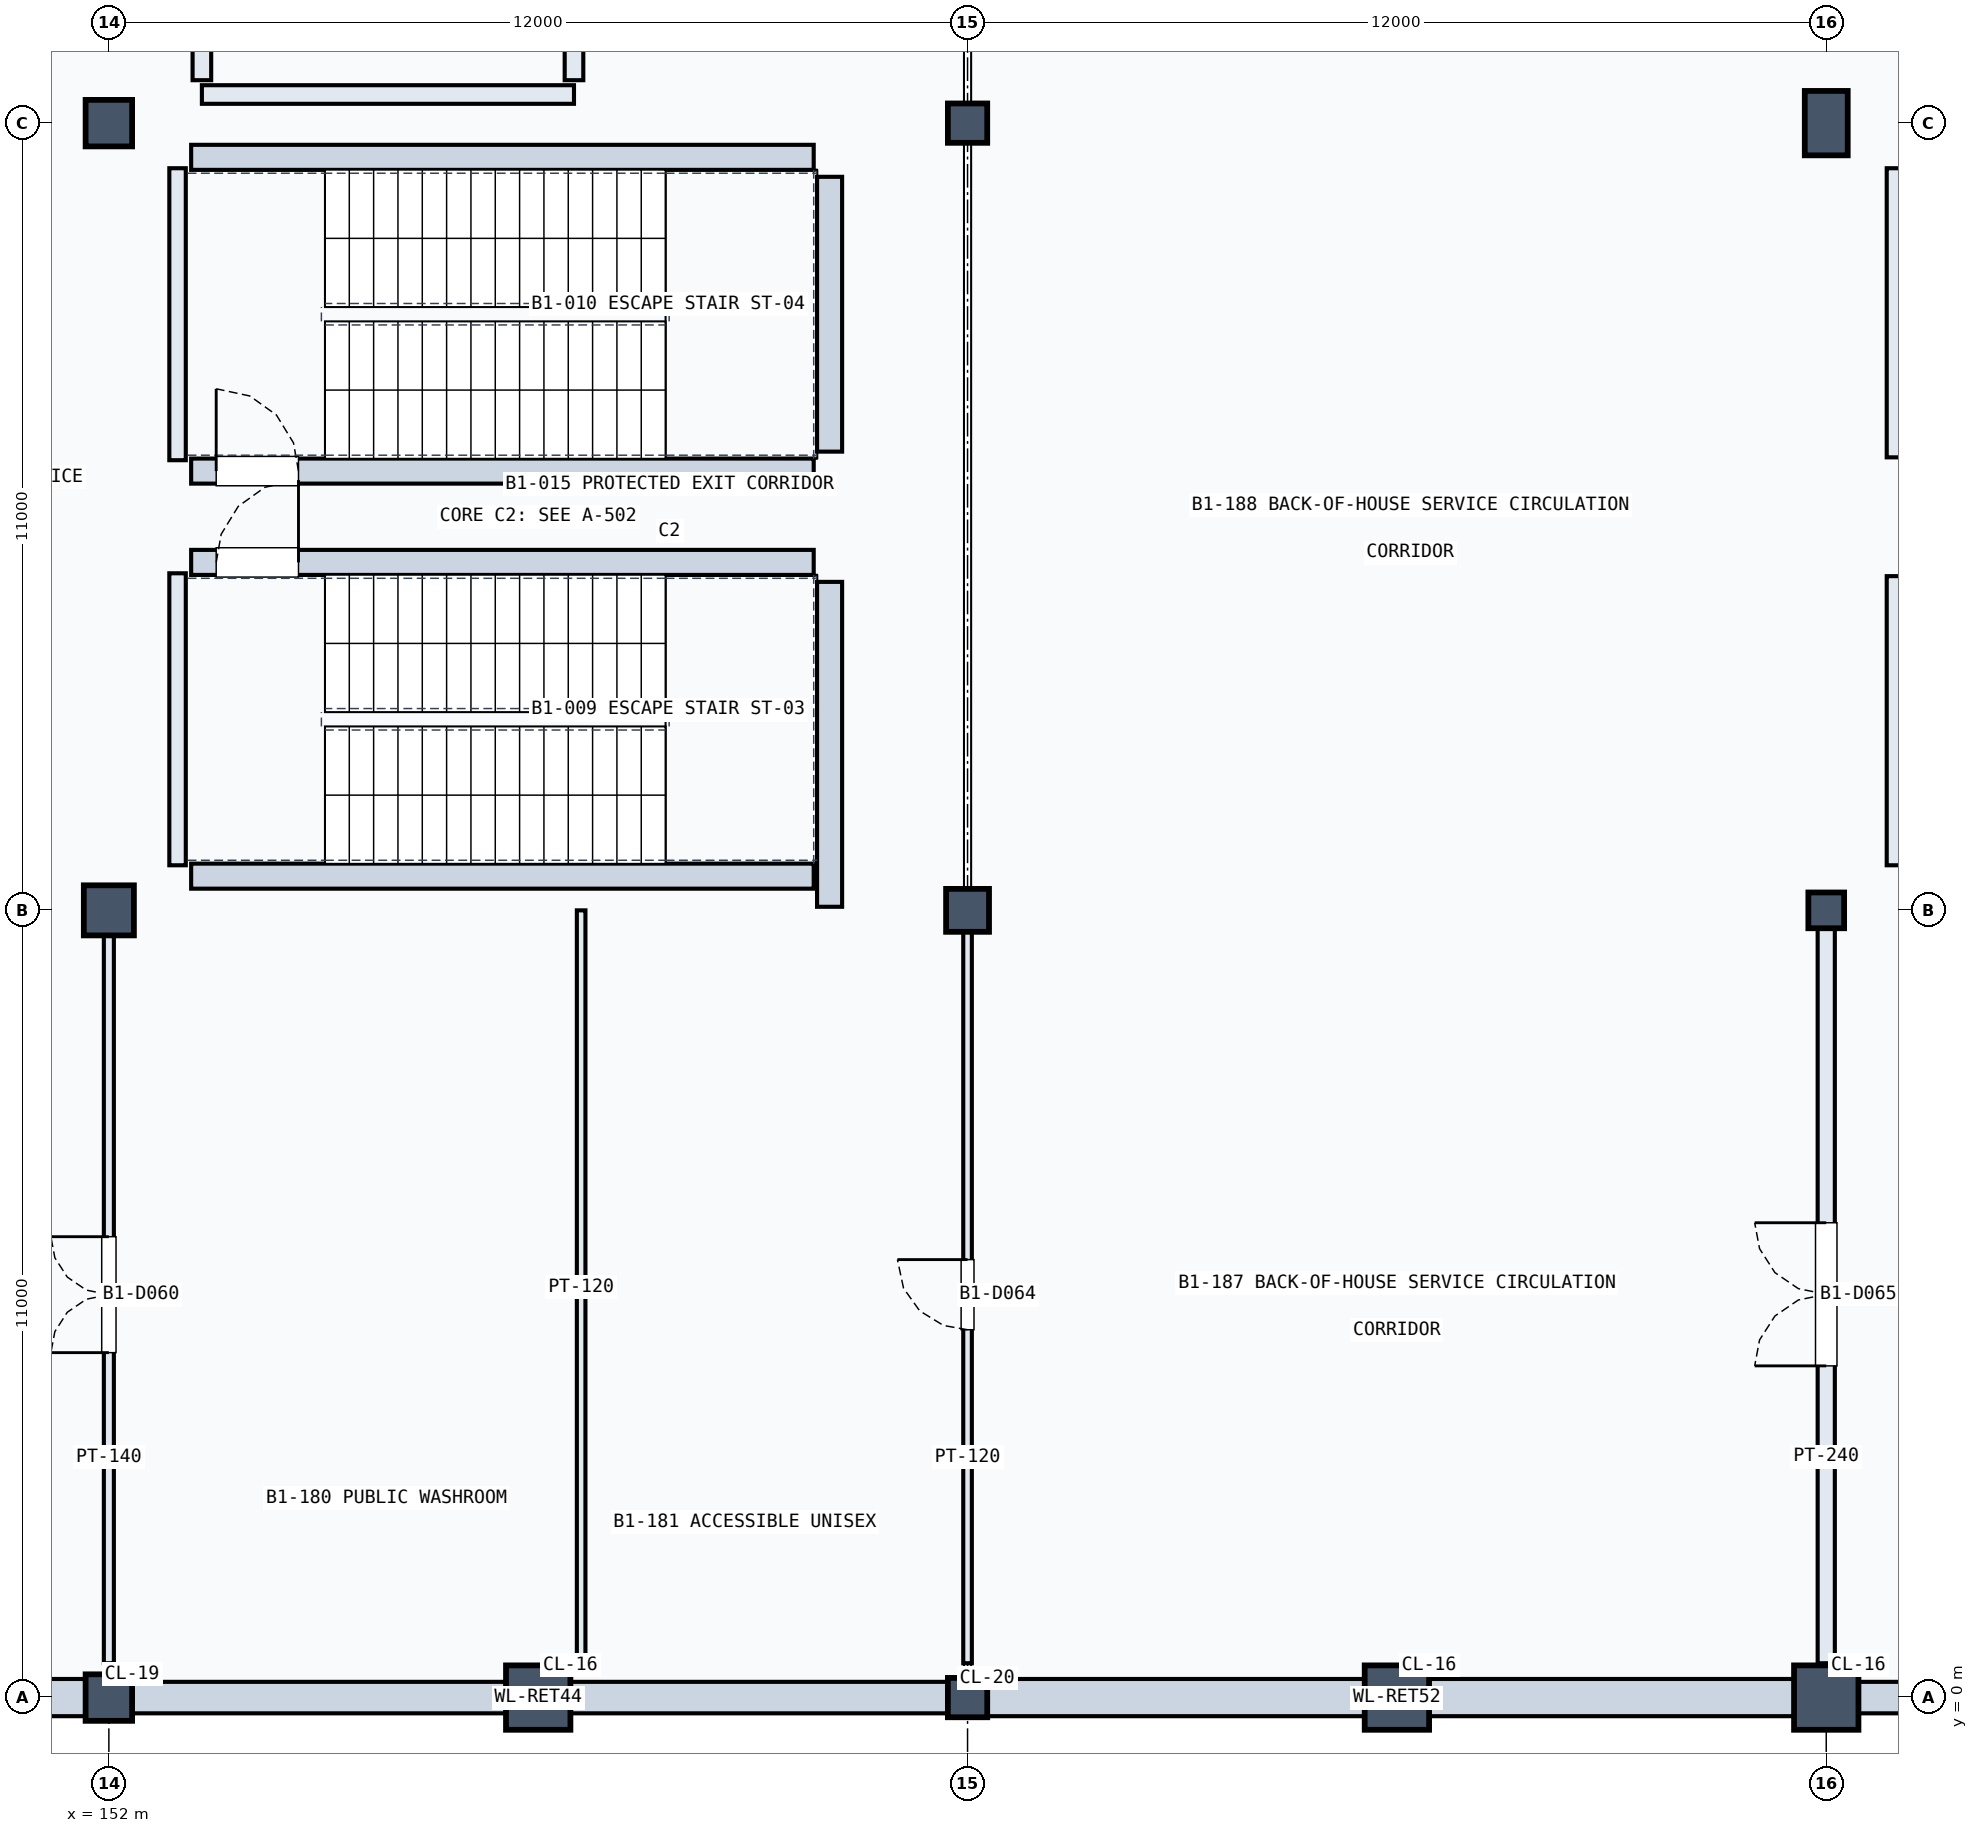
"""IFC4 building model, lengths in metres.
Left out: names, types, materials, properties, quantities, classifications, styles, units other than length and angle.
Written with IfcOpenShell. Run it as: python <this file> out.ifc"""

import sys

from ifc_helpers import new_model, si_unit, direction, frame, frame_2d, origin, origin_2d, place, context, subcontext, project, spatial, rectangle, circle, extrude, element, fill, save


model = new_model("IFC4")
c1 = context("Model", 3, precision=1e-05, world=origin(), true_north=direction((0.0, 1.0)))
c2 = subcontext(c1, "Body", "Model", "MODEL_VIEW")
j1 = project(units=[si_unit("LENGTHUNIT", "METRE"), si_unit("PLANEANGLEUNIT", "RADIAN")], contexts=[c1])
p1 = place(None, origin())
s1 = spatial("IfcSite", under=j1, at=p1, CompositionType="ELEMENT")
p2 = place(p1, origin())
s2 = spatial("IfcBuilding", under=s1, at=p2, CompositionType="ELEMENT")
p3 = place(p2, frame((0.0, 0.0, -5.4)))
s3 = spatial("IfcBuildingStorey", under=s2, at=p3, CompositionType="ELEMENT", Elevation=-5.4)
p4 = place(p3, frame((152.0, 0.0, 0.0), z_axis=(0.0, 0.0, 1.0), x_axis=(1.0, 0.0, 0.0)))
e1 = element("IfcColumn", 1, at=p4, inside=s3, PredefinedType="COLUMN", context=c2, shape_type="SweptSolid", body=[
    extrude(circle(Radius=0.325, at=origin_2d()), origin(), (0.0, 0.0, 1.0), 5.4),
])
p5 = place(p3, frame((152.0, 11.0, 0.0), z_axis=(0.0, 0.0, 1.0), x_axis=(1.0, 0.0, 0.0)))
e2 = element("IfcColumn", 2, at=p5, inside=s3, PredefinedType="COLUMN", context=c2, shape_type="SweptSolid", body=[
    extrude(rectangle(XDim=0.7, YDim=0.7, at=origin_2d()), origin(), (0.0, 0.0, 1.0), 5.4),
])
p6 = place(p3, frame((152.0, 22.0, 0.0), z_axis=(0.0, 0.0, 1.0), x_axis=(1.0, 0.0, 0.0)))
e3 = element("IfcColumn", 3, at=p6, inside=s3, PredefinedType="COLUMN", context=c2, shape_type="SweptSolid", body=[
    extrude(rectangle(XDim=0.65, YDim=0.65, at=origin_2d()), origin(), (0.0, 0.0, 1.0), 5.4),
])
p7 = place(p3, frame((164.0, 0.0, 0.0), z_axis=(0.0, 0.0, 1.0), x_axis=(1.0, 0.0, 0.0)))
e4 = element("IfcColumn", 4, at=p7, inside=s3, PredefinedType="COLUMN", context=c2, shape_type="SweptSolid", body=[
    extrude(circle(Radius=0.275, at=origin_2d()), origin(), (0.0, 0.0, 1.0), 5.4),
])
p8 = place(p3, frame((164.0, 11.0, 0.0), z_axis=(0.0, 0.0, 1.0), x_axis=(1.0, 0.0, 0.0)))
e5 = element("IfcColumn", 5, at=p8, inside=s3, PredefinedType="COLUMN", context=c2, shape_type="SweptSolid", body=[
    extrude(rectangle(XDim=0.6, YDim=0.6, at=origin_2d()), origin(), (0.0, 0.0, 1.0), 5.4),
])
p9 = place(p3, frame((164.0, 22.0, 0.0), z_axis=(0.0, 0.0, 1.0), x_axis=(1.0, 0.0, 0.0)))
e6 = element("IfcColumn", 6, at=p9, inside=s3, PredefinedType="COLUMN", context=c2, shape_type="SweptSolid", body=[
    extrude(rectangle(XDim=0.55, YDim=0.55, at=origin_2d()), origin(), (0.0, 0.0, 1.0), 5.4),
])
p10 = place(p3, frame((176.0, 0.0, 0.0), z_axis=(0.0, 0.0, 1.0), x_axis=(1.0, 0.0, 0.0)))
e7 = element("IfcColumn", 7, at=p10, inside=s3, PredefinedType="COLUMN", context=c2, shape_type="SweptSolid", body=[
    extrude(circle(Radius=0.45, at=origin_2d()), origin(), (0.0, 0.0, 1.0), 5.4),
])
p11 = place(p3, frame((176.0, 11.0, 0.0), z_axis=(0.0, 0.0, 1.0), x_axis=(1.0, 0.0, 0.0)))
e8 = element("IfcColumn", 8, at=p11, inside=s3, PredefinedType="COLUMN", context=c2, shape_type="SweptSolid", body=[
    extrude(rectangle(XDim=0.5, YDim=0.5, at=origin_2d()), origin(), (0.0, 0.0, 1.0), 5.4),
])
p12 = place(p3, frame((176.0, 22.0, 0.0), z_axis=(0.0, 0.0, 1.0), x_axis=(1.0, 0.0, 0.0)))
e9 = element("IfcColumn", 9, at=p12, inside=s3, PredefinedType="COLUMN", context=c2, shape_type="SweptSolid", body=[
    extrude(rectangle(XDim=0.6, YDim=0.9, at=origin_2d()), origin(), (0.0, 0.0, 1.0), 5.4),
])
for number, where, z_axis, x_axis in (
    (10, (158.0, 0.0, 0.0), (0.0, 0.0, 1.0), (1.0, 0.0, 0.0)),
    (11, (170.0, 0.0, 0.0), (0.0, 0.0, 1.0), (1.0, 0.0, 0.0)),
):
    element("IfcColumn", number, at=place(p3, frame(where, z_axis=z_axis, x_axis=x_axis)), inside=s3, PredefinedType="COLUMN", context=c2, shape_type="SweptSolid", body=[
        extrude(circle(Radius=0.45, at=origin_2d()), origin(), (0.0, 0.0, 1.0), 5.4),
    ])
p13 = place(p3, frame((140.22, 0.0, 0.0), z_axis=(0.0, 0.0, 1.0), x_axis=(1.0, 0.0, 0.0)))
e12 = element("IfcWall", 12, at=p13, inside=s3, PredefinedType="SOLIDWALL", context=c2, shape_type="SweptSolid", body=[
    extrude(rectangle(XDim=11.56, YDim=0.52, at=frame_2d((5.78, 0.0))), origin(), (0.0, 0.0, 1.0), 4.28),
])
p14 = place(p3, frame((152.22, 0.0, 0.0), z_axis=(0.0, 0.0, 1.0), x_axis=(1.0, 0.0, 0.0)))
e13 = element("IfcWall", 13, at=p14, inside=s3, PredefinedType="SOLIDWALL", context=c2, shape_type="SweptSolid", body=[
    extrude(rectangle(XDim=11.56, YDim=0.44, at=frame_2d((5.78, 0.0))), origin(), (0.0, 0.0, 1.0), 4.28),
])
p15 = place(p3, frame((164.22, 0.0, 0.0), z_axis=(0.0, 0.0, 1.0), x_axis=(1.0, 0.0, 0.0)))
e14 = element("IfcWall", 14, at=p15, inside=s3, PredefinedType="SOLIDWALL", context=c2, shape_type="SweptSolid", body=[
    extrude(rectangle(XDim=11.56, YDim=0.52, at=frame_2d((5.78, 0.0))), origin(), (0.0, 0.0, 1.0), 4.346),
])
p16 = place(p3, frame((176.22, 0.0, 0.0), z_axis=(0.0, 0.0, 1.0), x_axis=(1.0, 0.0, 0.0)))
e15 = element("IfcWall", 15, at=p16, inside=s3, PredefinedType="SOLIDWALL", context=c2, shape_type="SweptSolid", body=[
    extrude(rectangle(XDim=10.56, YDim=0.44, at=frame_2d((5.28, 0.0))), origin(), (0.0, 0.0, 1.0), 4.13),
])
p17 = place(p3, frame((152.96, 11.63, 0.0), z_axis=(0.0, 0.0, 1.0), x_axis=(0.0, 1.0, 0.0)))
e16 = element("IfcWall", 16, at=p17, inside=s3, PredefinedType="SOLIDWALL", context=c2, shape_type="SweptSolid", body=[
    extrude(rectangle(XDim=4.08, YDim=0.23, at=frame_2d((2.04, 0.0))), origin(), (0.0, 0.0, 1.0), 5.04),
])
p18 = place(p3, frame((162.072, 11.05, 0.0), z_axis=(0.0, 0.0, 1.0), x_axis=(0.0, 1.0, 0.0)))
e17 = element("IfcWall", 17, at=p18, inside=s3, PredefinedType="SOLIDWALL", context=c2, shape_type="SweptSolid", body=[
    extrude(rectangle(XDim=4.54, YDim=0.35, at=frame_2d((2.27, 0.0))), origin(), (0.0, 0.0, 1.0), 5.04),
])
p19 = place(p3, frame((153.15, 11.478, 0.0), z_axis=(0.0, 0.0, 1.0), x_axis=(1.0, 0.0, 0.0)))
e18 = element("IfcWall", 18, at=p19, inside=s3, PredefinedType="SOLIDWALL", context=c2, shape_type="SweptSolid", body=[
    extrude(rectangle(XDim=8.7, YDim=0.35, at=frame_2d((4.35, 0.0))), origin(), (0.0, 0.0, 1.0), 5.04),
])
p20 = place(p3, frame((153.15, 15.862, 0.0), z_axis=(0.0, 0.0, 1.0), x_axis=(1.0, 0.0, 0.0)))
e19 = element("IfcWall", 19, at=p20, inside=s3, PredefinedType="SOLIDWALL", context=c2, shape_type="SweptSolid", body=[
    extrude(rectangle(XDim=8.7, YDim=0.35, at=frame_2d((4.35, 0.0))), origin(), (0.0, 0.0, 1.0), 5.04),
])
p21 = place(p20, frame((0.35, 0.0, 0.0)))
e20 = element("IfcOpeningElement", 20, at=p21, cuts=e19, PredefinedType="OPENING", context=c2, shape_type="SweptSolid", body=[
    extrude(rectangle(XDim=1.15, YDim=2.2, at=frame_2d((0.575, 1.1))), frame((0.0, 0.185, 0.0), z_axis=(0.0, -1.0, 0.0), x_axis=(1.0, 0.0, 0.0)), (0.0, 0.0, 1.0), 0.37),
])
p22 = place(p3, frame((152.96, 17.29, 0.0), z_axis=(0.0, 0.0, 1.0), x_axis=(0.0, 1.0, 0.0)))
e21 = element("IfcWall", 21, at=p22, inside=s3, PredefinedType="SOLIDWALL", context=c2, shape_type="SweptSolid", body=[
    extrude(rectangle(XDim=4.08, YDim=0.23, at=frame_2d((2.04, 0.0))), origin(), (0.0, 0.0, 1.0), 5.04),
])
p23 = place(p3, frame((162.072, 17.41, 0.0), z_axis=(0.0, 0.0, 1.0), x_axis=(0.0, 1.0, 0.0)))
e22 = element("IfcWall", 22, at=p23, inside=s3, PredefinedType="SOLIDWALL", context=c2, shape_type="SweptSolid", body=[
    extrude(rectangle(XDim=3.84, YDim=0.35, at=frame_2d((1.92, 0.0))), origin(), (0.0, 0.0, 1.0), 5.04),
])
p24 = place(p3, frame((153.15, 17.138, 0.0), z_axis=(0.0, 0.0, 1.0), x_axis=(1.0, 0.0, 0.0)))
e23 = element("IfcWall", 23, at=p24, inside=s3, PredefinedType="SOLIDWALL", context=c2, shape_type="SweptSolid", body=[
    extrude(rectangle(XDim=8.7, YDim=0.35, at=frame_2d((4.35, 0.0))), origin(), (0.0, 0.0, 1.0), 5.04),
])
p25 = place(p24, frame((0.35, 0.0, 0.0)))
e24 = element("IfcOpeningElement", 24, at=p25, cuts=e23, PredefinedType="OPENING", context=c2, shape_type="SweptSolid", body=[
    extrude(rectangle(XDim=1.15, YDim=2.2, at=frame_2d((0.575, 1.1))), frame((0.0, 0.185, 0.0), z_axis=(0.0, -1.0, 0.0), x_axis=(1.0, 0.0, 0.0)), (0.0, 0.0, 1.0), 0.37),
])
p26 = place(p3, frame((153.15, 21.522, 0.0), z_axis=(0.0, 0.0, 1.0), x_axis=(1.0, 0.0, 0.0)))
e25 = element("IfcWall", 25, at=p26, inside=s3, PredefinedType="SOLIDWALL", context=c2, shape_type="SweptSolid", body=[
    extrude(rectangle(XDim=8.7, YDim=0.35, at=frame_2d((4.35, 0.0))), origin(), (0.0, 0.0, 1.0), 5.04),
])
p27 = place(p3, frame((153.3, 22.4, 0.0), z_axis=(0.0, 0.0, 1.0), x_axis=(1.0, 0.0, 0.0)))
e26 = element("IfcWall", 26, at=p27, inside=s3, PredefinedType="SOLIDWALL", context=c2, shape_type="SweptSolid", body=[
    extrude(rectangle(XDim=5.2, YDim=0.26, at=frame_2d((2.6, 0.0))), origin(), (0.0, 0.0, 1.0), 4.43),
])
p28 = place(p3, frame((153.3, 22.6, 0.0), z_axis=(0.0, 0.0, 1.0), x_axis=(0.0, 1.0, 0.0)))
e27 = element("IfcWall", 27, at=p28, inside=s3, PredefinedType="SOLIDWALL", context=c2, shape_type="SweptSolid", body=[
    extrude(rectangle(XDim=2.9, YDim=0.26, at=frame_2d((1.45, 0.0))), origin(), (0.0, 0.0, 1.0), 5.04),
])
p29 = place(p3, frame((158.5, 22.6, 0.0), z_axis=(0.0, 0.0, 1.0), x_axis=(0.0, 1.0, 0.0)))
e28 = element("IfcWall", 28, at=p29, inside=s3, PredefinedType="SOLIDWALL", context=c2, shape_type="SweptSolid", body=[
    extrude(rectangle(XDim=2.9, YDim=0.26, at=frame_2d((1.45, 0.0))), origin(), (0.0, 0.0, 1.0), 5.04),
])
p30 = place(p29, frame((0.5, 0.0, 0.0)))
e29 = element("IfcOpeningElement", 29, at=p30, cuts=e28, PredefinedType="OPENING", context=c2, shape_type="SweptSolid", body=[
    extrude(rectangle(XDim=1.9, YDim=2.2, at=frame_2d((0.95, 1.1))), frame((0.0, 0.14, 0.0), z_axis=(0.0, -1.0, 0.0), x_axis=(1.0, 0.0, 0.0)), (0.0, 0.0, 1.0), 0.28),
])
for number, where, z_axis, x_axis in (
    (30, (176.96, 11.63, 0.0), (0.0, 0.0, 1.0), (0.0, 1.0, 0.0)),
    (31, (176.96, 17.33, 0.0), (0.0, 0.0, 1.0), (0.0, 1.0, 0.0)),
):
    element("IfcWall", number, at=place(p3, frame(where, z_axis=z_axis, x_axis=x_axis)), inside=s3, PredefinedType="SOLIDWALL", context=c2, shape_type="SweptSolid", body=[
        extrude(rectangle(XDim=4.04, YDim=0.23, at=frame_2d((2.02, 0.0))), origin(), (0.0, 0.0, 1.0), 5.04),
    ])
p31 = place(p3, frame((152.0, 0.48, 0.0), z_axis=(0.0, 0.0, 1.0), x_axis=(0.0, 1.0, 0.0)))
e32 = element("IfcWall", 32, at=p31, inside=s3, PredefinedType="PARTITIONING", context=c2, shape_type="SweptSolid", body=[
    extrude(rectangle(XDim=10.3, YDim=0.14, at=frame_2d((5.15, 0.0))), origin(), (0.0, 0.0, 1.0), 4.23),
])
p32 = place(p31, frame((4.34, 0.0, 0.0)))
e33 = element("IfcOpeningElement", 33, at=p32, cuts=e32, PredefinedType="OPENING", context=c2, shape_type="SweptSolid", body=[
    extrude(rectangle(XDim=1.62, YDim=2.25, at=frame_2d((0.81, 1.125))), frame((0.0, 0.08, 0.0), z_axis=(0.0, -1.0, 0.0), x_axis=(1.0, 0.0, 0.0)), (0.0, 0.0, 1.0), 0.16),
])
p33 = place(p3, frame((164.0, 0.48, 0.0), z_axis=(0.0, 0.0, 1.0), x_axis=(0.0, 1.0, 0.0)))
e34 = element("IfcWall", 34, at=p33, inside=s3, PredefinedType="PARTITIONING", context=c2, shape_type="SweptSolid", body=[
    extrude(rectangle(XDim=10.3, YDim=0.12, at=frame_2d((5.15, 0.0))), origin(), (0.0, 0.0, 1.0), 4.28),
])
p34 = place(p33, frame((4.66, 0.0, 0.0)))
e35 = element("IfcOpeningElement", 35, at=p34, cuts=e34, PredefinedType="OPENING", context=c2, shape_type="SweptSolid", body=[
    extrude(rectangle(XDim=0.98, YDim=2.1, at=frame_2d((0.49, 1.05))), frame((0.0, 0.07, 0.0), z_axis=(0.0, -1.0, 0.0), x_axis=(1.0, 0.0, 0.0)), (0.0, 0.0, 1.0), 0.14),
])
p35 = place(p3, frame((176.0, 0.48, 0.0), z_axis=(0.0, 0.0, 1.0), x_axis=(0.0, 1.0, 0.0)))
e36 = element("IfcWall", 36, at=p35, inside=s3, PredefinedType="PARTITIONING", context=c2, shape_type="SweptSolid", body=[
    extrude(rectangle(XDim=10.31, YDim=0.24, at=frame_2d((5.155, 0.0))), origin(), (0.0, 0.0, 1.0), 4.33),
])
p36 = place(p35, frame((4.155, 0.0, 0.0)))
e37 = element("IfcOpeningElement", 37, at=p36, cuts=e36, PredefinedType="OPENING", context=c2, shape_type="SweptSolid", body=[
    extrude(rectangle(XDim=2.0, YDim=2.25, at=frame_2d((1.0, 1.125))), frame((0.0, 0.13, 0.0), z_axis=(0.0, -1.0, 0.0), x_axis=(1.0, 0.0, 0.0)), (0.0, 0.0, 1.0), 0.26),
])
p37 = place(p3, frame((158.6, 0.48, 0.0), z_axis=(0.0, 0.0, 1.0), x_axis=(0.0, 1.0, 0.0)))
e38 = element("IfcWall", 38, at=p37, inside=s3, PredefinedType="PARTITIONING", context=c2, shape_type="SweptSolid", body=[
    extrude(rectangle(XDim=10.52, YDim=0.12, at=frame_2d((5.26, 0.0))), origin(), (0.0, 0.0, 1.0), 4.28),
])
p38 = place(p21, origin())
e39 = element("IfcDoor", 39, at=p38, inside=s3, OperationType="SINGLE_SWING_RIGHT", PredefinedType="DOOR", context=c2, shape_type="SweptSolid", body=[
    extrude(rectangle(XDim=1.15, YDim=2.2, at=frame_2d((0.575, 1.1))), frame((0.0, 0.025, 0.0), z_axis=(0.0, -1.0, 0.0), x_axis=(1.0, 0.0, 0.0)), (0.0, 0.0, 1.0), 0.05),
])
fill(e20, e39)
p39 = place(p25, origin())
e40 = element("IfcDoor", 40, at=p39, inside=s3, OperationType="SINGLE_SWING_LEFT", PredefinedType="DOOR", context=c2, shape_type="SweptSolid", body=[
    extrude(rectangle(XDim=1.15, YDim=2.2, at=frame_2d((0.575, 1.1))), frame((0.0, 0.025, 0.0), z_axis=(0.0, -1.0, 0.0), x_axis=(1.0, 0.0, 0.0)), (0.0, 0.0, 1.0), 0.05),
])
fill(e24, e40)
p40 = place(p32, origin())
e41 = element("IfcDoor", 41, at=p40, inside=s3, OperationType="DOUBLE_DOOR_SINGLE_SWING", PredefinedType="DOOR", context=c2, shape_type="SweptSolid", body=[
    extrude(rectangle(XDim=1.62, YDim=2.25, at=frame_2d((0.81, 1.125))), frame((0.0, 0.025, 0.0), z_axis=(0.0, -1.0, 0.0), x_axis=(1.0, 0.0, 0.0)), (0.0, 0.0, 1.0), 0.05),
])
fill(e33, e41)
p41 = place(p34, origin())
e42 = element("IfcDoor", 42, at=p41, inside=s3, OperationType="SINGLE_SWING_RIGHT", PredefinedType="DOOR", context=c2, shape_type="SweptSolid", body=[
    extrude(rectangle(XDim=0.98, YDim=2.1, at=frame_2d((0.49, 1.05))), frame((0.0, 0.025, 0.0), z_axis=(0.0, -1.0, 0.0), x_axis=(1.0, 0.0, 0.0)), (0.0, 0.0, 1.0), 0.05),
])
fill(e35, e42)
p42 = place(p36, origin())
e43 = element("IfcDoor", 43, at=p42, inside=s3, OperationType="DOUBLE_DOOR_SINGLE_SWING", PredefinedType="DOOR", context=c2, shape_type="SweptSolid", body=[
    extrude(rectangle(XDim=2.0, YDim=2.25, at=frame_2d((1.0, 1.125))), frame((0.0, 0.025, 0.0), z_axis=(0.0, -1.0, 0.0), x_axis=(1.0, 0.0, 0.0)), (0.0, 0.0, 1.0), 0.05),
])
fill(e37, e43)
save(model, sys.argv[1])
